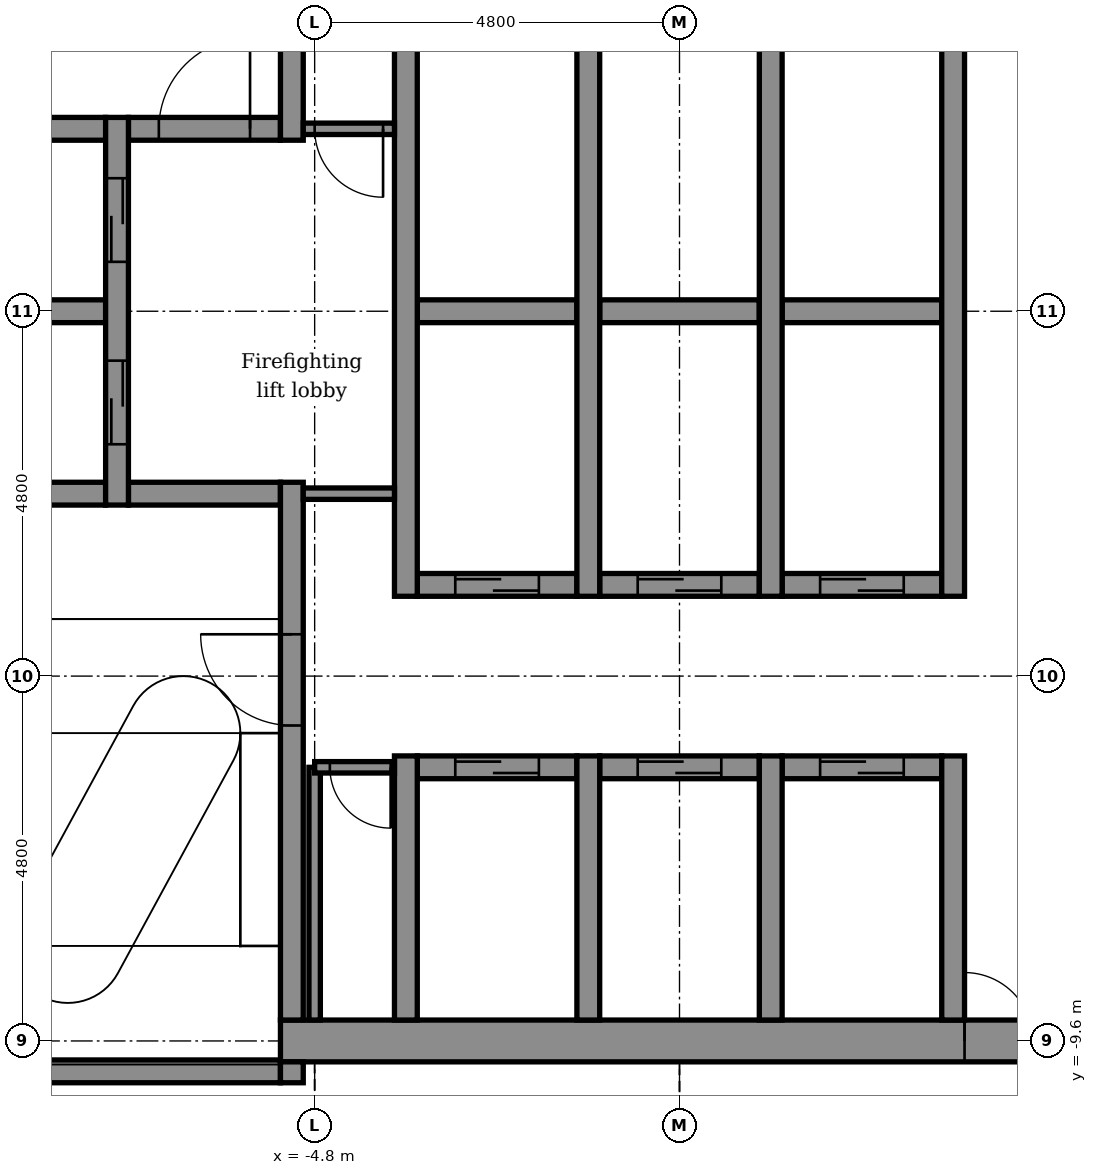
"""IFC4 building model, lengths in metres.
Left out: names, types, materials, properties, quantities, classifications, styles, units other than length and angle.
Written with IfcOpenShell. Run it as: python <this file> out.ifc"""

import sys

from ifc_helpers import new_model, si_unit, direction, frame, frame_2d, origin, place, context, subcontext, project, spatial, rectangle, extrude, element, fill, save


model = new_model("IFC4")
c1 = context("Model", 3, precision=1e-05, world=origin(), true_north=direction((0.0, 1.0)))
c2 = subcontext(c1, "Body", "Model", "MODEL_VIEW")
j1 = project(units=[si_unit("LENGTHUNIT", "METRE"), si_unit("PLANEANGLEUNIT", "RADIAN")], contexts=[c1])
p1 = place(None, origin())
s1 = spatial("IfcSite", under=j1, at=p1, CompositionType="ELEMENT")
p2 = place(p1, origin())
s2 = spatial("IfcBuilding", under=s1, at=p2, CompositionType="ELEMENT")
p3 = place(p2, frame((0.0, 0.0, 222.8)))
s3 = spatial("IfcBuildingStorey", under=s2, at=p3, CompositionType="ELEMENT", Elevation=222.8)
p4 = place(p3, frame((-9.325, -10.0, -0.15), z_axis=(0.0, 0.0, 1.0), x_axis=(1.0, 0.0, 0.0)))
e1 = element("IfcWall", 1, at=p4, inside=s3, PredefinedType="STANDARD", context=c2, shape_type="SweptSolid", body=[
    extrude(rectangle(XDim=4.075, YDim=0.3, at=frame_2d((2.038, 0.0))), origin(), (0.0, 0.0, 1.0), 3.9),
])
p5 = place(p3, frame((-5.25, -9.6, -0.15), z_axis=(0.0, 0.0, 1.0), x_axis=(1.0, 0.0, 0.0)))
e2 = element("IfcWall", 2, at=p5, inside=s3, PredefinedType="SHEAR", context=c2, shape_type="SweptSolid", body=[
    extrude(rectangle(XDim=10.2, YDim=0.55, at=frame_2d((5.1, 0.0))), origin(), (0.0, 0.0, 1.0), 3.9),
])
p6 = place(p5, frame((9.0, 0.0, 0.15)))
e3 = element("IfcOpeningElement", 3, at=p6, cuts=e2, PredefinedType="OPENING", context=c2, shape_type="SweptSolid", body=[
    extrude(rectangle(XDim=0.9, YDim=2.1, at=frame_2d((0.45, 1.05))), frame((0.0, 0.285, 0.0), z_axis=(0.0, -1.0, 0.0), x_axis=(1.0, 0.0, 0.0)), (0.0, 0.0, 1.0), 0.57),
])
p7 = place(p3, frame((-3.45, -6.0, -0.15), z_axis=(0.0, 0.0, 1.0), x_axis=(1.0, 0.0, 0.0)))
e4 = element("IfcWall", 4, at=p7, inside=s3, PredefinedType="STANDARD", context=c2, shape_type="SweptSolid", body=[
    extrude(rectangle(XDim=2.1, YDim=0.3, at=frame_2d((1.05, 0.0))), origin(), (0.0, 0.0, 1.0), 3.9),
])
p8 = place(p7, frame((0.5, 0.0, 0.15)))
e5 = element("IfcOpeningElement", 5, at=p8, cuts=e4, PredefinedType="OPENING", context=c2, shape_type="SweptSolid", body=[
    extrude(rectangle(XDim=1.1, YDim=2.1, at=frame_2d((0.55, 1.05))), frame((0.0, 0.16, 0.0), z_axis=(0.0, -1.0, 0.0), x_axis=(1.0, 0.0, 0.0)), (0.0, 0.0, 1.0), 0.32),
])
p9 = place(p3, frame((-1.05, -6.0, -0.15), z_axis=(0.0, 0.0, 1.0), x_axis=(1.0, 0.0, 0.0)))
e6 = element("IfcWall", 6, at=p9, inside=s3, PredefinedType="STANDARD", context=c2, shape_type="SweptSolid", body=[
    extrude(rectangle(XDim=2.1, YDim=0.3, at=frame_2d((1.05, 0.0))), origin(), (0.0, 0.0, 1.0), 3.9),
])
p10 = place(p9, frame((0.5, 0.0, 0.15)))
e7 = element("IfcOpeningElement", 7, at=p10, cuts=e6, PredefinedType="OPENING", context=c2, shape_type="SweptSolid", body=[
    extrude(rectangle(XDim=1.1, YDim=2.1, at=frame_2d((0.55, 1.05))), frame((0.0, 0.16, 0.0), z_axis=(0.0, -1.0, 0.0), x_axis=(1.0, 0.0, 0.0)), (0.0, 0.0, 1.0), 0.32),
])
p11 = place(p3, frame((1.35, -6.0, -0.15), z_axis=(0.0, 0.0, 1.0), x_axis=(1.0, 0.0, 0.0)))
e8 = element("IfcWall", 8, at=p11, inside=s3, PredefinedType="STANDARD", context=c2, shape_type="SweptSolid", body=[
    extrude(rectangle(XDim=2.1, YDim=0.3, at=frame_2d((1.05, 0.0))), origin(), (0.0, 0.0, 1.0), 3.9),
])
p12 = place(p11, frame((0.5, 0.0, 0.15)))
e9 = element("IfcOpeningElement", 9, at=p12, cuts=e8, PredefinedType="OPENING", context=c2, shape_type="SweptSolid", body=[
    extrude(rectangle(XDim=1.1, YDim=2.1, at=frame_2d((0.55, 1.05))), frame((0.0, 0.16, 0.0), z_axis=(0.0, -1.0, 0.0), x_axis=(1.0, 0.0, 0.0)), (0.0, 0.0, 1.0), 0.32),
])
p13 = place(p3, frame((-3.45, -3.6, -0.15), z_axis=(0.0, 0.0, 1.0), x_axis=(1.0, 0.0, 0.0)))
e10 = element("IfcWall", 10, at=p13, inside=s3, PredefinedType="STANDARD", context=c2, shape_type="SweptSolid", body=[
    extrude(rectangle(XDim=2.1, YDim=0.3, at=frame_2d((1.05, 0.0))), origin(), (0.0, 0.0, 1.0), 3.9),
])
p14 = place(p13, frame((0.5, 0.0, 0.15)))
e11 = element("IfcOpeningElement", 11, at=p14, cuts=e10, PredefinedType="OPENING", context=c2, shape_type="SweptSolid", body=[
    extrude(rectangle(XDim=1.1, YDim=2.1, at=frame_2d((0.55, 1.05))), frame((0.0, 0.16, 0.0), z_axis=(0.0, -1.0, 0.0), x_axis=(1.0, 0.0, 0.0)), (0.0, 0.0, 1.0), 0.32),
])
p15 = place(p3, frame((-1.05, -3.6, -0.15), z_axis=(0.0, 0.0, 1.0), x_axis=(1.0, 0.0, 0.0)))
e12 = element("IfcWall", 12, at=p15, inside=s3, PredefinedType="STANDARD", context=c2, shape_type="SweptSolid", body=[
    extrude(rectangle(XDim=2.1, YDim=0.3, at=frame_2d((1.05, 0.0))), origin(), (0.0, 0.0, 1.0), 3.9),
])
p16 = place(p15, frame((0.5, 0.0, 0.15)))
e13 = element("IfcOpeningElement", 13, at=p16, cuts=e12, PredefinedType="OPENING", context=c2, shape_type="SweptSolid", body=[
    extrude(rectangle(XDim=1.1, YDim=2.1, at=frame_2d((0.55, 1.05))), frame((0.0, 0.16, 0.0), z_axis=(0.0, -1.0, 0.0), x_axis=(1.0, 0.0, 0.0)), (0.0, 0.0, 1.0), 0.32),
])
p17 = place(p3, frame((1.35, -3.6, -0.15), z_axis=(0.0, 0.0, 1.0), x_axis=(1.0, 0.0, 0.0)))
e14 = element("IfcWall", 14, at=p17, inside=s3, PredefinedType="STANDARD", context=c2, shape_type="SweptSolid", body=[
    extrude(rectangle(XDim=2.1, YDim=0.3, at=frame_2d((1.05, 0.0))), origin(), (0.0, 0.0, 1.0), 3.9),
])
p18 = place(p17, frame((0.5, 0.0, 0.15)))
e15 = element("IfcOpeningElement", 15, at=p18, cuts=e14, PredefinedType="OPENING", context=c2, shape_type="SweptSolid", body=[
    extrude(rectangle(XDim=1.1, YDim=2.1, at=frame_2d((0.55, 1.05))), frame((0.0, 0.16, 0.0), z_axis=(0.0, -1.0, 0.0), x_axis=(1.0, 0.0, 0.0)), (0.0, 0.0, 1.0), 0.32),
])
p19 = place(p3, frame((-9.45, -2.4, -0.15), z_axis=(0.0, 0.0, 1.0), x_axis=(1.0, 0.0, 0.0)))
e16 = element("IfcWall", 16, at=p19, inside=s3, PredefinedType="STANDARD", context=c2, shape_type="SweptSolid", body=[
    extrude(rectangle(XDim=1.9, YDim=0.3, at=frame_2d((0.95, 0.0))), origin(), (0.0, 0.0, 1.0), 3.9),
])
p20 = place(p3, frame((-7.25, -2.4, -0.15), z_axis=(0.0, 0.0, 1.0), x_axis=(1.0, 0.0, 0.0)))
e17 = element("IfcWall", 17, at=p20, inside=s3, PredefinedType="STANDARD", context=c2, shape_type="SweptSolid", body=[
    extrude(rectangle(XDim=2.0, YDim=0.3, at=frame_2d((1.0, 0.0))), origin(), (0.0, 0.0, 1.0), 3.9),
])
p21 = place(p3, frame((-10.85, 0.0, -0.15), z_axis=(0.0, 0.0, 1.0), x_axis=(1.0, 0.0, 0.0)))
e18 = element("IfcWall", 18, at=p21, inside=s3, PredefinedType="STANDARD", context=c2, shape_type="SweptSolid", body=[
    extrude(rectangle(XDim=3.3, YDim=0.3, at=frame_2d((1.65, 0.0))), origin(), (0.0, 0.0, 1.0), 3.9),
])
p22 = place(p3, frame((-3.45, 0.0, -0.15), z_axis=(0.0, 0.0, 1.0), x_axis=(1.0, 0.0, 0.0)))
e19 = element("IfcWall", 19, at=p22, inside=s3, PredefinedType="STANDARD", context=c2, shape_type="SweptSolid", body=[
    extrude(rectangle(XDim=2.1, YDim=0.3, at=frame_2d((1.05, 0.0))), origin(), (0.0, 0.0, 1.0), 3.9),
])
p23 = place(p3, frame((-1.05, 0.0, -0.15), z_axis=(0.0, 0.0, 1.0), x_axis=(1.0, 0.0, 0.0)))
e20 = element("IfcWall", 20, at=p23, inside=s3, PredefinedType="STANDARD", context=c2, shape_type="SweptSolid", body=[
    extrude(rectangle(XDim=2.1, YDim=0.3, at=frame_2d((1.05, 0.0))), origin(), (0.0, 0.0, 1.0), 3.9),
])
p24 = place(p3, frame((1.35, 0.0, -0.15), z_axis=(0.0, 0.0, 1.0), x_axis=(1.0, 0.0, 0.0)))
e21 = element("IfcWall", 21, at=p24, inside=s3, PredefinedType="STANDARD", context=c2, shape_type="SweptSolid", body=[
    extrude(rectangle(XDim=2.1, YDim=0.3, at=frame_2d((1.05, 0.0))), origin(), (0.0, 0.0, 1.0), 3.9),
])
p25 = place(p3, frame((-9.45, 2.4, -0.15), z_axis=(0.0, 0.0, 1.0), x_axis=(1.0, 0.0, 0.0)))
e22 = element("IfcWall", 22, at=p25, inside=s3, PredefinedType="STANDARD", context=c2, shape_type="SweptSolid", body=[
    extrude(rectangle(XDim=1.9, YDim=0.3, at=frame_2d((0.95, 0.0))), origin(), (0.0, 0.0, 1.0), 3.9),
])
p26 = place(p3, frame((-7.25, 2.4, -0.15), z_axis=(0.0, 0.0, 1.0), x_axis=(1.0, 0.0, 0.0)))
e23 = element("IfcWall", 23, at=p26, inside=s3, PredefinedType="STANDARD", context=c2, shape_type="SweptSolid", body=[
    extrude(rectangle(XDim=2.0, YDim=0.3, at=frame_2d((1.0, 0.0))), origin(), (0.0, 0.0, 1.0), 3.9),
])
p27 = place(p26, frame((0.4, 0.0, 0.15)))
e24 = element("IfcOpeningElement", 24, at=p27, cuts=e23, PredefinedType="OPENING", context=c2, shape_type="SweptSolid", body=[
    extrude(rectangle(XDim=1.2, YDim=2.1, at=frame_2d((0.6, 1.05))), frame((0.0, 0.16, 0.0), z_axis=(0.0, -1.0, 0.0), x_axis=(1.0, 0.0, 0.0)), (0.0, 0.0, 1.0), 0.32),
])
p28 = place(p3, frame((-7.4, -2.55, -0.15), z_axis=(0.0, 0.0, 1.0), x_axis=(0.0, 1.0, 0.0)))
e25 = element("IfcWall", 25, at=p28, inside=s3, PredefinedType="STANDARD", context=c2, shape_type="SweptSolid", body=[
    extrude(rectangle(XDim=5.1, YDim=0.3, at=frame_2d((2.55, 0.0))), origin(), (0.0, 0.0, 1.0), 3.9),
])
p29 = place(p28, frame((0.8, 0.0, 0.15)))
e26 = element("IfcOpeningElement", 26, at=p29, cuts=e25, PredefinedType="OPENING", context=c2, shape_type="SweptSolid", body=[
    extrude(rectangle(XDim=1.1, YDim=2.1, at=frame_2d((0.55, 1.05))), frame((0.0, 0.16, 0.0), z_axis=(0.0, -1.0, 0.0), x_axis=(1.0, 0.0, 0.0)), (0.0, 0.0, 1.0), 0.32),
])
p30 = place(p28, frame((3.2, 0.0, 0.15)))
e27 = element("IfcOpeningElement", 27, at=p30, cuts=e25, PredefinedType="OPENING", context=c2, shape_type="SweptSolid", body=[
    extrude(rectangle(XDim=1.1, YDim=2.1, at=frame_2d((0.55, 1.05))), frame((0.0, 0.16, 0.0), z_axis=(0.0, -1.0, 0.0), x_axis=(1.0, 0.0, 0.0)), (0.0, 0.0, 1.0), 0.32),
])
p31 = place(p3, frame((-5.1, -10.15, -0.15), z_axis=(0.0, 0.0, 1.0), x_axis=(0.0, 1.0, 0.0)))
e28 = element("IfcWall", 28, at=p31, inside=s3, PredefinedType="STANDARD", context=c2, shape_type="SweptSolid", body=[
    extrude(rectangle(XDim=0.275, YDim=0.3, at=frame_2d((0.137, 0.0))), origin(), (0.0, 0.0, 1.0), 3.9),
])
p32 = place(p3, frame((-5.1, -9.325, -0.15), z_axis=(0.0, 0.0, 1.0), x_axis=(0.0, 1.0, 0.0)))
e29 = element("IfcWall", 29, at=p32, inside=s3, PredefinedType="STANDARD", context=c2, shape_type="SweptSolid", body=[
    extrude(rectangle(XDim=7.075, YDim=0.3, at=frame_2d((3.538, 0.0))), origin(), (0.0, 0.0, 1.0), 3.9),
])
p33 = place(p32, frame((3.875, 0.0, 0.15)))
e30 = element("IfcOpeningElement", 30, at=p33, cuts=e29, PredefinedType="OPENING", context=c2, shape_type="SweptSolid", body=[
    extrude(rectangle(XDim=1.2, YDim=2.1, at=frame_2d((0.6, 1.05))), frame((0.0, 0.16, 0.0), z_axis=(0.0, -1.0, 0.0), x_axis=(1.0, 0.0, 0.0)), (0.0, 0.0, 1.0), 0.32),
])
p34 = place(p3, frame((-5.1, 2.25, -0.15), z_axis=(0.0, 0.0, 1.0), x_axis=(0.0, 1.0, 0.0)))
e31 = element("IfcWall", 31, at=p34, inside=s3, PredefinedType="STANDARD", context=c2, shape_type="SweptSolid", body=[
    extrude(rectangle(XDim=7.075, YDim=0.3, at=frame_2d((3.538, 0.0))), origin(), (0.0, 0.0, 1.0), 3.9),
])
p35 = place(p34, frame((2.0, 0.0, 0.15)))
e32 = element("IfcOpeningElement", 32, at=p35, cuts=e31, PredefinedType="OPENING", context=c2, shape_type="SweptSolid", body=[
    extrude(rectangle(XDim=1.2, YDim=2.1, at=frame_2d((0.6, 1.05))), frame((0.0, 0.16, 0.0), z_axis=(0.0, -1.0, 0.0), x_axis=(1.0, 0.0, 0.0)), (0.0, 0.0, 1.0), 0.32),
])
p36 = place(p3, frame((-3.6, -9.325, -0.15), z_axis=(0.0, 0.0, 1.0), x_axis=(0.0, 1.0, 0.0)))
e33 = element("IfcWall", 33, at=p36, inside=s3, PredefinedType="STANDARD", context=c2, shape_type="SweptSolid", body=[
    extrude(rectangle(XDim=3.475, YDim=0.3, at=frame_2d((1.737, 0.0))), origin(), (0.0, 0.0, 1.0), 3.9),
])
p37 = place(p3, frame((-3.6, -3.75, -0.15), z_axis=(0.0, 0.0, 1.0), x_axis=(0.0, 1.0, 0.0)))
e34 = element("IfcWall", 34, at=p37, inside=s3, PredefinedType="STANDARD", context=c2, shape_type="SweptSolid", body=[
    extrude(rectangle(XDim=7.5, YDim=0.3, at=frame_2d((3.75, 0.0))), origin(), (0.0, 0.0, 1.0), 3.9),
])
p38 = place(p3, frame((-1.2, -9.325, -0.15), z_axis=(0.0, 0.0, 1.0), x_axis=(0.0, 1.0, 0.0)))
e35 = element("IfcWall", 35, at=p38, inside=s3, PredefinedType="STANDARD", context=c2, shape_type="SweptSolid", body=[
    extrude(rectangle(XDim=3.475, YDim=0.3, at=frame_2d((1.737, 0.0))), origin(), (0.0, 0.0, 1.0), 3.9),
])
p39 = place(p3, frame((-1.2, -3.75, -0.15), z_axis=(0.0, 0.0, 1.0), x_axis=(0.0, 1.0, 0.0)))
e36 = element("IfcWall", 36, at=p39, inside=s3, PredefinedType="STANDARD", context=c2, shape_type="SweptSolid", body=[
    extrude(rectangle(XDim=7.5, YDim=0.3, at=frame_2d((3.75, 0.0))), origin(), (0.0, 0.0, 1.0), 3.9),
])
p40 = place(p3, frame((1.2, -9.325, -0.15), z_axis=(0.0, 0.0, 1.0), x_axis=(0.0, 1.0, 0.0)))
e37 = element("IfcWall", 37, at=p40, inside=s3, PredefinedType="STANDARD", context=c2, shape_type="SweptSolid", body=[
    extrude(rectangle(XDim=3.475, YDim=0.3, at=frame_2d((1.737, 0.0))), origin(), (0.0, 0.0, 1.0), 3.9),
])
p41 = place(p3, frame((1.2, -3.75, -0.15), z_axis=(0.0, 0.0, 1.0), x_axis=(0.0, 1.0, 0.0)))
e38 = element("IfcWall", 38, at=p41, inside=s3, PredefinedType="STANDARD", context=c2, shape_type="SweptSolid", body=[
    extrude(rectangle(XDim=7.5, YDim=0.3, at=frame_2d((3.75, 0.0))), origin(), (0.0, 0.0, 1.0), 3.9),
])
p42 = place(p3, frame((3.6, -9.325, -0.15), z_axis=(0.0, 0.0, 1.0), x_axis=(0.0, 1.0, 0.0)))
e39 = element("IfcWall", 39, at=p42, inside=s3, PredefinedType="STANDARD", context=c2, shape_type="SweptSolid", body=[
    extrude(rectangle(XDim=3.475, YDim=0.3, at=frame_2d((1.737, 0.0))), origin(), (0.0, 0.0, 1.0), 3.9),
])
p43 = place(p3, frame((3.6, -3.75, -0.15), z_axis=(0.0, 0.0, 1.0), x_axis=(0.0, 1.0, 0.0)))
e40 = element("IfcWall", 40, at=p43, inside=s3, PredefinedType="STANDARD", context=c2, shape_type="SweptSolid", body=[
    extrude(rectangle(XDim=7.5, YDim=0.3, at=frame_2d((3.75, 0.0))), origin(), (0.0, 0.0, 1.0), 3.9),
])
p44 = place(p3, frame((-4.8, -9.325, 0.0), z_axis=(0.0, 0.0, 1.0), x_axis=(0.0, 1.0, 0.0)))
e41 = element("IfcWall", 41, at=p44, inside=s3, PredefinedType="PARTITIONING", context=c2, shape_type="SweptSolid", body=[
    extrude(rectangle(XDim=3.325, YDim=0.15, at=frame_2d((1.663, 0.0))), origin(), (0.0, 0.0, 1.0), 3.75),
])
p45 = place(p3, frame((-4.8, -6.0, 0.0), z_axis=(0.0, 0.0, 1.0), x_axis=(1.0, 0.0, 0.0)))
e42 = element("IfcWall", 42, at=p45, inside=s3, PredefinedType="PARTITIONING", context=c2, shape_type="SweptSolid", body=[
    extrude(rectangle(XDim=1.05, YDim=0.15, at=frame_2d((0.525, 0.0))), origin(), (0.0, 0.0, 1.0), 3.75),
])
p46 = place(p45, frame((0.2, 0.0, 0.0)))
e43 = element("IfcOpeningElement", 43, at=p46, cuts=e42, PredefinedType="OPENING", context=c2, shape_type="SweptSolid", body=[
    extrude(rectangle(XDim=0.8, YDim=2.1, at=frame_2d((0.4, 1.05))), frame((0.0, 0.085, 0.0), z_axis=(0.0, -1.0, 0.0), x_axis=(1.0, 0.0, 0.0)), (0.0, 0.0, 1.0), 0.17),
])
p47 = place(p3, frame((-4.95, 2.4, 0.0), z_axis=(0.0, 0.0, 1.0), x_axis=(1.0, 0.0, 0.0)))
e44 = element("IfcWall", 44, at=p47, inside=s3, PredefinedType="PARTITIONING", context=c2, shape_type="SweptSolid", body=[
    extrude(rectangle(XDim=1.2, YDim=0.15, at=frame_2d((0.6, 0.0))), origin(), (0.0, 0.0, 1.0), 3.75),
])
p48 = place(p47, frame((0.15, 0.0, 0.0)))
e45 = element("IfcOpeningElement", 45, at=p48, cuts=e44, PredefinedType="OPENING", context=c2, shape_type="SweptSolid", body=[
    extrude(rectangle(XDim=0.9, YDim=2.1, at=frame_2d((0.45, 1.05))), frame((0.0, 0.085, 0.0), z_axis=(0.0, -1.0, 0.0), x_axis=(1.0, 0.0, 0.0)), (0.0, 0.0, 1.0), 0.17),
])
p49 = place(p3, frame((-4.95, -2.4, 0.0), z_axis=(0.0, 0.0, 1.0), x_axis=(1.0, 0.0, 0.0)))
e46 = element("IfcWall", 46, at=p49, inside=s3, PredefinedType="PARTITIONING", context=c2, shape_type="SweptSolid", body=[
    extrude(rectangle(XDim=1.2, YDim=0.15, at=frame_2d((0.6, 0.0))), origin(), (0.0, 0.0, 1.0), 3.75),
])
p50 = place(p46, frame((0.8, 0.0, 0.0), z_axis=(0.0, 0.0, 1.0), x_axis=(-1.0, 0.0, 0.0)))
e47 = element("IfcDoor", 47, at=p50, inside=s3, OperationType="SINGLE_SWING_RIGHT", PredefinedType="DOOR", context=c2, shape_type="SweptSolid", body=[
    extrude(rectangle(XDim=0.8, YDim=2.1, at=frame_2d((0.4, 1.05))), frame((0.0, 0.025, 0.0), z_axis=(0.0, -1.0, 0.0), x_axis=(1.0, 0.0, 0.0)), (0.0, 0.0, 1.0), 0.05),
])
fill(e43, e47)
p51 = place(p29, origin())
e48 = element("IfcDoor", 48, at=p51, inside=s3, OperationType="DOUBLE_DOOR_SLIDING", PredefinedType="DOOR", context=c2, shape_type="SweptSolid", body=[
    extrude(rectangle(XDim=1.1, YDim=2.1, at=frame_2d((0.55, 1.05))), frame((0.0, 0.025, 0.0), z_axis=(0.0, -1.0, 0.0), x_axis=(1.0, 0.0, 0.0)), (0.0, 0.0, 1.0), 0.05),
])
fill(e26, e48)
p52 = place(p30, origin())
e49 = element("IfcDoor", 49, at=p52, inside=s3, OperationType="DOUBLE_DOOR_SLIDING", PredefinedType="DOOR", context=c2, shape_type="SweptSolid", body=[
    extrude(rectangle(XDim=1.1, YDim=2.1, at=frame_2d((0.55, 1.05))), frame((0.0, 0.025, 0.0), z_axis=(0.0, -1.0, 0.0), x_axis=(1.0, 0.0, 0.0)), (0.0, 0.0, 1.0), 0.05),
])
fill(e27, e49)
p53 = place(p14, origin())
e50 = element("IfcDoor", 50, at=p53, inside=s3, OperationType="DOUBLE_DOOR_SLIDING", PredefinedType="DOOR", context=c2, shape_type="SweptSolid", body=[
    extrude(rectangle(XDim=1.1, YDim=2.1, at=frame_2d((0.55, 1.05))), frame((0.0, 0.025, 0.0), z_axis=(0.0, -1.0, 0.0), x_axis=(1.0, 0.0, 0.0)), (0.0, 0.0, 1.0), 0.05),
])
fill(e11, e50)
p54 = place(p16, origin())
e51 = element("IfcDoor", 51, at=p54, inside=s3, OperationType="DOUBLE_DOOR_SLIDING", PredefinedType="DOOR", context=c2, shape_type="SweptSolid", body=[
    extrude(rectangle(XDim=1.1, YDim=2.1, at=frame_2d((0.55, 1.05))), frame((0.0, 0.025, 0.0), z_axis=(0.0, -1.0, 0.0), x_axis=(1.0, 0.0, 0.0)), (0.0, 0.0, 1.0), 0.05),
])
fill(e13, e51)
p55 = place(p18, origin())
e52 = element("IfcDoor", 52, at=p55, inside=s3, OperationType="DOUBLE_DOOR_SLIDING", PredefinedType="DOOR", context=c2, shape_type="SweptSolid", body=[
    extrude(rectangle(XDim=1.1, YDim=2.1, at=frame_2d((0.55, 1.05))), frame((0.0, 0.025, 0.0), z_axis=(0.0, -1.0, 0.0), x_axis=(1.0, 0.0, 0.0)), (0.0, 0.0, 1.0), 0.05),
])
fill(e15, e52)
p56 = place(p8, origin())
e53 = element("IfcDoor", 53, at=p56, inside=s3, OperationType="DOUBLE_DOOR_SLIDING", PredefinedType="DOOR", context=c2, shape_type="SweptSolid", body=[
    extrude(rectangle(XDim=1.1, YDim=2.1, at=frame_2d((0.55, 1.05))), frame((0.0, 0.025, 0.0), z_axis=(0.0, -1.0, 0.0), x_axis=(1.0, 0.0, 0.0)), (0.0, 0.0, 1.0), 0.05),
])
fill(e5, e53)
p57 = place(p10, origin())
e54 = element("IfcDoor", 54, at=p57, inside=s3, OperationType="DOUBLE_DOOR_SLIDING", PredefinedType="DOOR", context=c2, shape_type="SweptSolid", body=[
    extrude(rectangle(XDim=1.1, YDim=2.1, at=frame_2d((0.55, 1.05))), frame((0.0, 0.025, 0.0), z_axis=(0.0, -1.0, 0.0), x_axis=(1.0, 0.0, 0.0)), (0.0, 0.0, 1.0), 0.05),
])
fill(e7, e54)
p58 = place(p12, origin())
e55 = element("IfcDoor", 55, at=p58, inside=s3, OperationType="DOUBLE_DOOR_SLIDING", PredefinedType="DOOR", context=c2, shape_type="SweptSolid", body=[
    extrude(rectangle(XDim=1.1, YDim=2.1, at=frame_2d((0.55, 1.05))), frame((0.0, 0.025, 0.0), z_axis=(0.0, -1.0, 0.0), x_axis=(1.0, 0.0, 0.0)), (0.0, 0.0, 1.0), 0.05),
])
fill(e9, e55)
p59 = place(p33, origin())
e56 = element("IfcDoor", 56, at=p59, inside=s3, OperationType="SINGLE_SWING_RIGHT", PredefinedType="DOOR", context=c2, shape_type="SweptSolid", body=[
    extrude(rectangle(XDim=1.2, YDim=2.1, at=frame_2d((0.6, 1.05))), frame((0.0, 0.025, 0.0), z_axis=(0.0, -1.0, 0.0), x_axis=(1.0, 0.0, 0.0)), (0.0, 0.0, 1.0), 0.05),
])
fill(e30, e56)
p60 = place(p6, origin())
e57 = element("IfcDoor", 57, at=p60, inside=s3, OperationType="SINGLE_SWING_LEFT", PredefinedType="DOOR", context=c2, shape_type="SweptSolid", body=[
    extrude(rectangle(XDim=0.9, YDim=2.1, at=frame_2d((0.45, 1.05))), frame((0.0, 0.025, 0.0), z_axis=(0.0, -1.0, 0.0), x_axis=(1.0, 0.0, 0.0)), (0.0, 0.0, 1.0), 0.05),
])
fill(e3, e57)
p61 = place(p48, frame((0.9, 0.0, 0.0), z_axis=(0.0, 0.0, 1.0), x_axis=(-1.0, 0.0, 0.0)))
e58 = element("IfcDoor", 58, at=p61, inside=s3, OperationType="SINGLE_SWING_RIGHT", PredefinedType="DOOR", context=c2, shape_type="SweptSolid", body=[
    extrude(rectangle(XDim=0.9, YDim=2.1, at=frame_2d((0.45, 1.05))), frame((0.0, 0.025, 0.0), z_axis=(0.0, -1.0, 0.0), x_axis=(1.0, 0.0, 0.0)), (0.0, 0.0, 1.0), 0.05),
])
fill(e45, e58)
p62 = place(p27, origin())
e59 = element("IfcDoor", 59, at=p62, inside=s3, OperationType="SINGLE_SWING_RIGHT", PredefinedType="DOOR", context=c2, shape_type="SweptSolid", body=[
    extrude(rectangle(XDim=1.2, YDim=2.1, at=frame_2d((0.6, 1.05))), frame((0.0, 0.025, 0.0), z_axis=(0.0, -1.0, 0.0), x_axis=(1.0, 0.0, 0.0)), (0.0, 0.0, 1.0), 0.05),
])
fill(e24, e59)
save(model, sys.argv[1])
